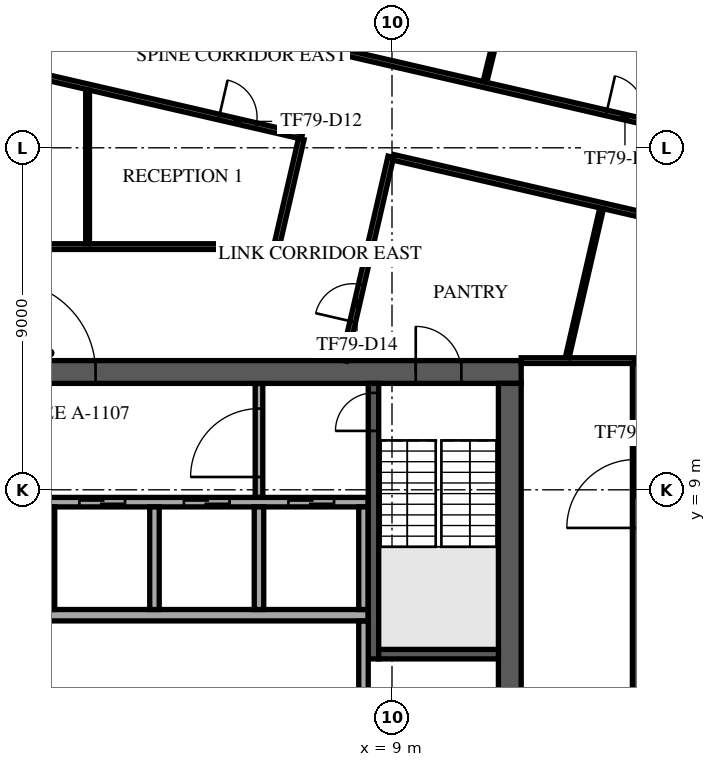
"""IFC4 building model, lengths in metres.
Left out: names, types, materials, properties, quantities, classifications, styles, units other than length and angle.
Written with IfcOpenShell. Run it as: python <this file> out.ifc"""

import sys

from ifc_helpers import new_model, si_unit, direction, frame, frame_2d, origin, place, context, subcontext, project, spatial, rectangle, extrude, element, fill, save


model = new_model("IFC4")
c1 = context("Model", 3, precision=1e-05, world=origin(), true_north=direction((0.0, 1.0)))
c2 = subcontext(c1, "Body", "Model", "MODEL_VIEW")
j1 = project(units=[si_unit("LENGTHUNIT", "METRE"), si_unit("PLANEANGLEUNIT", "RADIAN")], contexts=[c1])
p1 = place(None, origin())
s1 = spatial("IfcSite", under=j1, at=p1, CompositionType="ELEMENT")
p2 = place(p1, origin())
s2 = spatial("IfcBuilding", under=s1, at=p2, CompositionType="ELEMENT")
p3 = place(p2, frame((0.0, 0.0, 332.5)))
s3 = spatial("IfcBuildingStorey", under=s2, at=p3, CompositionType="ELEMENT", Elevation=332.5)
p4 = place(p3, frame((-12.4, 12.1, 0.0), z_axis=(0.0, 0.0, 1.0), x_axis=(1.0, 0.0, 0.0)))
e1 = element("IfcWall", 1, at=p4, inside=s3, PredefinedType="SHEAR", context=c2, shape_type="SweptSolid", body=[
    extrude(rectangle(XDim=24.8, YDim=0.6, at=frame_2d((12.4, 0.0))), origin(), (0.0, 0.0, 1.0), 3.65),
])
p5 = place(p4, frame((11.2, 0.0, 0.0)))
e2 = element("IfcOpeningElement", 2, at=p5, cuts=e1, PredefinedType="OPENING", context=c2, shape_type="SweptSolid", body=[
    extrude(rectangle(XDim=2.4, YDim=2.4, at=frame_2d((1.2, 1.2))), frame((0.0, 0.31, 0.0), z_axis=(0.0, -1.0, 0.0), x_axis=(1.0, 0.0, 0.0)), (0.0, 0.0, 1.0), 0.62),
])
p6 = place(p4, frame((22.025, 0.0, 0.0)))
e3 = element("IfcOpeningElement", 3, at=p6, cuts=e1, PredefinedType="OPENING", context=c2, shape_type="SweptSolid", body=[
    extrude(rectangle(XDim=1.2, YDim=2.1, at=frame_2d((0.6, 1.05))), frame((0.0, 0.31, 0.0), z_axis=(0.0, -1.0, 0.0), x_axis=(1.0, 0.0, 0.0)), (0.0, 0.0, 1.0), 0.62),
])
p7 = place(p4, frame((1.0, 0.0, 0.0)))
e4 = element("IfcOpeningElement", 4, at=p7, cuts=e1, PredefinedType="OPENING", context=c2, shape_type="SweptSolid", body=[
    extrude(rectangle(XDim=1.0, YDim=2.1, at=frame_2d((0.5, 1.05))), frame((0.0, 0.31, 0.0), z_axis=(0.0, -1.0, 0.0), x_axis=(1.0, 0.0, 0.0)), (0.0, 0.0, 1.0), 0.62),
])
p8 = place(p3, frame((12.1, -11.8, 0.0), z_axis=(0.0, 0.0, 1.0), x_axis=(0.0, 1.0, 0.0)))
e5 = element("IfcWall", 5, at=p8, inside=s3, PredefinedType="SHEAR", context=c2, shape_type="SweptSolid", body=[
    extrude(rectangle(XDim=23.6, YDim=0.6, at=frame_2d((11.8, 0.0))), origin(), (0.0, 0.0, 1.0), 3.65),
])
p9 = place(p8, frame((10.6, 0.0, 0.0)))
e6 = element("IfcOpeningElement", 6, at=p9, cuts=e5, PredefinedType="OPENING", context=c2, shape_type="SweptSolid", body=[
    extrude(rectangle(XDim=2.4, YDim=2.4, at=frame_2d((1.2, 1.2))), frame((0.0, 0.31, 0.0), z_axis=(0.0, -1.0, 0.0), x_axis=(1.0, 0.0, 0.0)), (0.0, 0.0, 1.0), 0.62),
])
p10 = place(p3, frame((-8.375, 5.7, 0.0), z_axis=(0.0, 0.0, 1.0), x_axis=(1.0, 0.0, 0.0)))
e7 = element("IfcWall", 7, at=p10, inside=s3, PredefinedType="SOLIDWALL", context=c2, shape_type="SweptSolid", body=[
    extrude(rectangle(XDim=16.75, YDim=0.3, at=frame_2d((8.375, 0.0))), origin(), (0.0, 0.0, 1.0), 3.65),
])
p11 = place(p3, frame((-8.375, 8.675, 0.0), z_axis=(0.0, 0.0, 1.0), x_axis=(1.0, 0.0, 0.0)))
e8 = element("IfcWall", 8, at=p11, inside=s3, PredefinedType="SOLIDWALL", context=c2, shape_type="SweptSolid", body=[
    extrude(rectangle(XDim=16.75, YDim=0.25, at=frame_2d((8.375, 0.0))), origin(), (0.0, 0.0, 1.0), 3.65),
])
p12 = place(p11, frame((0.9, 0.0, 0.0)))
e9 = element("IfcOpeningElement", 9, at=p12, cuts=e8, PredefinedType="OPENING", context=c2, shape_type="SweptSolid", body=[
    extrude(rectangle(XDim=1.2, YDim=2.1, at=frame_2d((0.6, 1.05))), frame((0.0, 0.135, 0.0), z_axis=(0.0, -1.0, 0.0), x_axis=(1.0, 0.0, 0.0)), (0.0, 0.0, 1.0), 0.27),
])
p13 = place(p11, frame((3.65, 0.0, 0.0)))
e10 = element("IfcOpeningElement", 10, at=p13, cuts=e8, PredefinedType="OPENING", context=c2, shape_type="SweptSolid", body=[
    extrude(rectangle(XDim=1.2, YDim=2.1, at=frame_2d((0.6, 1.05))), frame((0.0, 0.135, 0.0), z_axis=(0.0, -1.0, 0.0), x_axis=(1.0, 0.0, 0.0)), (0.0, 0.0, 1.0), 0.27),
])
p14 = place(p11, frame((6.4, 0.0, 0.0)))
e11 = element("IfcOpeningElement", 11, at=p14, cuts=e8, PredefinedType="OPENING", context=c2, shape_type="SweptSolid", body=[
    extrude(rectangle(XDim=1.2, YDim=2.1, at=frame_2d((0.6, 1.05))), frame((0.0, 0.135, 0.0), z_axis=(0.0, -1.0, 0.0), x_axis=(1.0, 0.0, 0.0)), (0.0, 0.0, 1.0), 0.27),
])
p15 = place(p11, frame((9.15, 0.0, 0.0)))
e12 = element("IfcOpeningElement", 12, at=p15, cuts=e8, PredefinedType="OPENING", context=c2, shape_type="SweptSolid", body=[
    extrude(rectangle(XDim=1.2, YDim=2.1, at=frame_2d((0.6, 1.05))), frame((0.0, 0.135, 0.0), z_axis=(0.0, -1.0, 0.0), x_axis=(1.0, 0.0, 0.0)), (0.0, 0.0, 1.0), 0.27),
])
p16 = place(p11, frame((11.9, 0.0, 0.0)))
e13 = element("IfcOpeningElement", 13, at=p16, cuts=e8, PredefinedType="OPENING", context=c2, shape_type="SweptSolid", body=[
    extrude(rectangle(XDim=1.2, YDim=2.1, at=frame_2d((0.6, 1.05))), frame((0.0, 0.135, 0.0), z_axis=(0.0, -1.0, 0.0), x_axis=(1.0, 0.0, 0.0)), (0.0, 0.0, 1.0), 0.27),
])
p17 = place(p11, frame((14.65, 0.0, 0.0)))
e14 = element("IfcOpeningElement", 14, at=p17, cuts=e8, PredefinedType="OPENING", context=c2, shape_type="SweptSolid", body=[
    extrude(rectangle(XDim=1.2, YDim=2.1, at=frame_2d((0.6, 1.05))), frame((0.0, 0.135, 0.0), z_axis=(0.0, -1.0, 0.0), x_axis=(1.0, 0.0, 0.0)), (0.0, 0.0, 1.0), 0.27),
])
for number, where, z_axis, x_axis in (
    (15, (0.0, 5.85, 0.0), (0.0, 0.0, 1.0), (0.0, 1.0, 0.0)),
    (16, (2.75, 5.85, 0.0), (0.0, 0.0, 1.0), (0.0, 1.0, 0.0)),
    (17, (5.5, 5.85, 0.0), (0.0, 0.0, 1.0), (0.0, 1.0, 0.0)),
    (18, (8.25, 5.85, 0.0), (0.0, 0.0, 1.0), (0.0, 1.0, 0.0)),
):
    element("IfcWall", number, at=place(p3, frame(where, z_axis=z_axis, x_axis=x_axis)), inside=s3, PredefinedType="SOLIDWALL", context=c2, shape_type="SweptSolid", body=[
        extrude(rectangle(XDim=2.7, YDim=0.25, at=frame_2d((1.35, 0.0))), origin(), (0.0, 0.0, 1.0), 3.65),
    ])
p18 = place(p3, frame((8.512, 4.55, 0.0), z_axis=(0.0, 0.0, 1.0), x_axis=(0.0, 1.0, 0.0)))
e19 = element("IfcWall", 19, at=p18, inside=s3, PredefinedType="SOLIDWALL", context=c2, shape_type="SweptSolid", body=[
    extrude(rectangle(XDim=7.25, YDim=0.275, at=frame_2d((3.625, 0.0))), origin(), (0.0, 0.0, 1.0), 3.65),
])
p19 = place(p18, frame((6.0, 0.0, 0.0)))
e20 = element("IfcOpeningElement", 20, at=p19, cuts=e19, PredefinedType="OPENING", context=c2, shape_type="SweptSolid", body=[
    extrude(rectangle(XDim=1.0, YDim=2.1, at=frame_2d((0.5, 1.05))), frame((0.0, 0.147, 0.0), z_axis=(0.0, -1.0, 0.0), x_axis=(1.0, 0.0, 0.0)), (0.0, 0.0, 1.0), 0.295),
])
p20 = place(p3, frame((8.65, 4.675, 0.0), z_axis=(0.0, 0.0, 1.0), x_axis=(1.0, 0.0, 0.0)))
e21 = element("IfcWall", 21, at=p20, inside=s3, PredefinedType="SOLIDWALL", context=c2, shape_type="SweptSolid", body=[
    extrude(rectangle(XDim=3.15, YDim=0.25, at=frame_2d((1.575, 0.0))), origin(), (0.0, 0.0, 1.0), 3.65),
])
p21 = place(p3, frame((8.25, 2.855, 0.0), z_axis=(0.0, 0.0, 1.0), x_axis=(0.0, 1.0, 0.0)))
e22 = element("IfcWall", 22, at=p21, inside=s3, PredefinedType="PARTITIONING", context=c2, shape_type="SweptSolid", body=[
    extrude(rectangle(XDim=2.69, YDim=0.25, at=frame_2d((1.345, 0.0))), origin(), (0.0, 0.0, 1.0), 3.65),
])
p22 = place(p3, frame((5.5, 8.805, 0.0), z_axis=(0.0, 0.0, 1.0), x_axis=(0.0, 1.0, 0.0)))
e23 = element("IfcWall", 23, at=p22, inside=s3, PredefinedType="PARTITIONING", context=c2, shape_type="SweptSolid", body=[
    extrude(rectangle(XDim=2.99, YDim=0.2, at=frame_2d((1.495, 0.0))), origin(), (0.0, 0.0, 1.0), 3.65),
])
p23 = place(p22, frame((0.532, 0.0, 0.0)))
e24 = element("IfcOpeningElement", 24, at=p23, cuts=e23, PredefinedType="OPENING", context=c2, shape_type="SweptSolid", body=[
    extrude(rectangle(XDim=1.8, YDim=2.1, at=frame_2d((0.9, 1.05))), frame((0.0, 0.11, 0.0), z_axis=(0.0, -1.0, 0.0), x_axis=(1.0, 0.0, 0.0)), (0.0, 0.0, 1.0), 0.22),
])
p24 = place(p3, frame((-15.325, 15.4, 0.0), z_axis=(0.0, 0.0, 1.0), x_axis=(1.0, 0.0, 0.0)))
e25 = element("IfcWall", 25, at=p24, inside=s3, PredefinedType="PARTITIONING", context=c2, shape_type="SweptSolid", body=[
    extrude(rectangle(XDim=21.285, YDim=0.15, at=frame_2d((10.643, 0.0))), origin(), (0.0, 0.0, 1.0), 3.25),
])
p25 = place(p24, frame((7.665, 0.0, 0.0)))
e26 = element("IfcOpeningElement", 26, at=p25, cuts=e25, PredefinedType="OPENING", context=c2, shape_type="SweptSolid", body=[
    extrude(rectangle(XDim=1.0, YDim=2.1, at=frame_2d((0.5, 1.05))), frame((0.0, 0.085, 0.0), z_axis=(0.0, -1.0, 0.0), x_axis=(1.0, 0.0, 0.0)), (0.0, 0.0, 1.0), 0.17),
])
p26 = place(p24, frame((13.647, 0.0, 0.0)))
e27 = element("IfcOpeningElement", 27, at=p26, cuts=e25, PredefinedType="OPENING", context=c2, shape_type="SweptSolid", body=[
    extrude(rectangle(XDim=1.0, YDim=2.1, at=frame_2d((0.5, 1.05))), frame((0.0, 0.085, 0.0), z_axis=(0.0, -1.0, 0.0), x_axis=(1.0, 0.0, 0.0)), (0.0, 0.0, 1.0), 0.17),
])
p27 = place(p3, frame((-12.802, 22.79, 0.0), z_axis=(0.0, 0.0, 1.0), x_axis=(0.974371384758, -0.224945336838, 0.0)))
e28 = element("IfcWall", 28, at=p27, inside=s3, PredefinedType="PARTITIONING", context=c2, shape_type="SweptSolid", body=[
    extrude(rectangle(XDim=19.943, YDim=0.15, at=frame_2d((9.972, 0.0))), origin(), (0.0, 0.0, 1.0), 3.25),
])
p28 = place(p27, frame((17.705, 0.0, 0.0)))
e29 = element("IfcOpeningElement", 29, at=p28, cuts=e28, PredefinedType="OPENING", context=c2, shape_type="SweptSolid", body=[
    extrude(rectangle(XDim=1.0, YDim=2.1, at=frame_2d((0.5, 1.05))), frame((0.0, 0.085, 0.0), z_axis=(0.0, -1.0, 0.0), x_axis=(1.0, 0.0, 0.0)), (0.0, 0.0, 1.0), 0.17),
])
p29 = place(p3, frame((-12.262, 25.129, 0.0), z_axis=(0.0, 0.0, 1.0), x_axis=(0.974366228137, -0.224967672045, 0.0)))
e30 = element("IfcWall", 30, at=p29, inside=s3, PredefinedType="PARTITIONING", context=c2, shape_type="SweptSolid", body=[
    extrude(rectangle(XDim=35.276, YDim=0.15, at=frame_2d((17.638, 0.0))), origin(), (0.0, 0.0, 1.0), 3.25),
])
p30 = place(p29, frame((1.05, 0.0, 0.0)))
e31 = element("IfcOpeningElement", 31, at=p30, cuts=e30, PredefinedType="OPENING", context=c2, shape_type="SweptSolid", body=[
    extrude(rectangle(XDim=1.8, YDim=2.1, at=frame_2d((0.9, 1.05))), frame((0.0, 0.085, 0.0), z_axis=(0.0, -1.0, 0.0), x_axis=(1.0, 0.0, 0.0)), (0.0, 0.0, 1.0), 0.17),
])
p31 = place(p29, frame((8.524, 0.0, 0.0)))
e32 = element("IfcOpeningElement", 32, at=p31, cuts=e30, PredefinedType="OPENING", context=c2, shape_type="SweptSolid", body=[
    extrude(rectangle(XDim=1.0, YDim=2.1, at=frame_2d((0.5, 1.05))), frame((0.0, 0.085, 0.0), z_axis=(0.0, -1.0, 0.0), x_axis=(1.0, 0.0, 0.0)), (0.0, 0.0, 1.0), 0.17),
])
p32 = place(p29, frame((17.144, 0.0, 0.0)))
e33 = element("IfcOpeningElement", 33, at=p32, cuts=e30, PredefinedType="OPENING", context=c2, shape_type="SweptSolid", body=[
    extrude(rectangle(XDim=1.0, YDim=2.1, at=frame_2d((0.5, 1.05))), frame((0.0, 0.085, 0.0), z_axis=(0.0, -1.0, 0.0), x_axis=(1.0, 0.0, 0.0)), (0.0, 0.0, 1.0), 0.17),
])
p33 = place(p29, frame((27.613, 0.0, 0.0)))
e34 = element("IfcOpeningElement", 34, at=p33, cuts=e30, PredefinedType="OPENING", context=c2, shape_type="SweptSolid", body=[
    extrude(rectangle(XDim=1.0, YDim=2.1, at=frame_2d((0.5, 1.05))), frame((0.0, 0.085, 0.0), z_axis=(0.0, -1.0, 0.0), x_axis=(1.0, 0.0, 0.0)), (0.0, 0.0, 1.0), 0.17),
])
p34 = place(p3, frame((5.981, 15.492, 0.0), z_axis=(0.0, 0.0, 1.0), x_axis=(0.224777043794, 0.97441022192, 0.0)))
e35 = element("IfcWall", 35, at=p34, inside=s3, PredefinedType="PARTITIONING", context=c2, shape_type="SweptSolid", body=[
    extrude(rectangle(XDim=2.811, YDim=0.15, at=frame_2d((1.406, 0.0))), origin(), (0.0, 0.0, 1.0), 3.65),
])
p35 = place(p3, frame((7.731, 12.4, 0.0), z_axis=(0.0, 0.0, 1.0), x_axis=(0.224891896022, 0.974383720668, 0.0)))
e36 = element("IfcWall", 36, at=p35, inside=s3, PredefinedType="PARTITIONING", context=c2, shape_type="SweptSolid", body=[
    extrude(rectangle(XDim=5.505, YDim=0.15, at=frame_2d((2.752, 0.0))), origin(), (0.0, 0.0, 1.0), 3.13),
])
p36 = place(p35, frame((1.05, 0.0, 0.0)))
e37 = element("IfcOpeningElement", 37, at=p36, cuts=e36, PredefinedType="OPENING", context=c2, shape_type="SweptSolid", body=[
    extrude(rectangle(XDim=1.0, YDim=2.1, at=frame_2d((0.5, 1.05))), frame((0.0, 0.085, 0.0), z_axis=(0.0, -1.0, 0.0), x_axis=(1.0, 0.0, 0.0)), (0.0, 0.0, 1.0), 0.17),
])
p37 = place(p3, frame((9.042, 17.747, 0.0), z_axis=(0.0, 0.0, 1.0), x_axis=(0.974374231644, -0.224933004931, 0.0)))
e38 = element("IfcWall", 38, at=p37, inside=s3, PredefinedType="PARTITIONING", context=c2, shape_type="SweptSolid", body=[
    extrude(rectangle(XDim=12.858, YDim=0.15, at=frame_2d((6.429, 0.0))), origin(), (0.0, 0.0, 1.0), 3.25),
])
p38 = place(p3, frame((12.4, 12.4, 0.0), z_axis=(0.0, 0.0, 1.0), x_axis=(1.0, 0.0, 0.0)))
e39 = element("IfcWall", 39, at=p38, inside=s3, PredefinedType="PARTITIONING", context=c2, shape_type="SweptSolid", body=[
    extrude(rectangle(XDim=3.0, YDim=0.15, at=frame_2d((1.5, 0.0))), origin(), (0.0, 0.0, 1.0), 3.13),
])
p39 = place(p3, frame((15.4, -15.325, 0.0), z_axis=(0.0, 0.0, 1.0), x_axis=(0.0, 1.0, 0.0)))
e40 = element("IfcWall", 40, at=p39, inside=s3, PredefinedType="PARTITIONING", context=c2, shape_type="SweptSolid", body=[
    extrude(rectangle(XDim=27.65, YDim=0.15, at=frame_2d((13.825, 0.0))), origin(), (0.0, 0.0, 1.0), 3.25),
])
p40 = place(p39, frame((0.55, 0.0, 0.0)))
e41 = element("IfcOpeningElement", 41, at=p40, cuts=e40, PredefinedType="OPENING", context=c2, shape_type="SweptSolid", body=[
    extrude(rectangle(XDim=1.8, YDim=2.1, at=frame_2d((0.9, 1.05))), frame((0.0, 0.085, 0.0), z_axis=(0.0, -1.0, 0.0), x_axis=(1.0, 0.0, 0.0)), (0.0, 0.0, 1.0), 0.17),
])
p41 = place(p39, frame((6.678, 0.0, 0.0)))
e42 = element("IfcOpeningElement", 42, at=p41, cuts=e40, PredefinedType="OPENING", context=c2, shape_type="SweptSolid", body=[
    extrude(rectangle(XDim=1.0, YDim=2.1, at=frame_2d((0.5, 1.05))), frame((0.0, 0.085, 0.0), z_axis=(0.0, -1.0, 0.0), x_axis=(1.0, 0.0, 0.0)), (0.0, 0.0, 1.0), 0.17),
])
p42 = place(p39, frame((23.322, 0.0, 0.0)))
e43 = element("IfcOpeningElement", 43, at=p42, cuts=e40, PredefinedType="OPENING", context=c2, shape_type="SweptSolid", body=[
    extrude(rectangle(XDim=1.8, YDim=2.1, at=frame_2d((0.9, 1.05))), frame((0.0, 0.085, 0.0), z_axis=(0.0, -1.0, 0.0), x_axis=(1.0, 0.0, 0.0)), (0.0, 0.0, 1.0), 0.17),
])
p43 = place(p3, frame((0.99, 15.475, 0.0), z_axis=(0.0, 0.0, 1.0), x_axis=(0.0, 1.0, 0.0)))
e44 = element("IfcWall", 44, at=p43, inside=s3, PredefinedType="PARTITIONING", context=c2, shape_type="SweptSolid", body=[
    extrude(rectangle(XDim=4.042, YDim=0.1, at=frame_2d((2.021, 0.0))), origin(), (0.0, 0.0, 1.0), 3.65),
])
p44 = place(p3, frame((11.445, 19.733, 0.0), z_axis=(0.0, 0.0, 1.0), x_axis=(0.238465178955, 0.971151048203, 0.0)))
e45 = element("IfcWall", 45, at=p44, inside=s3, PredefinedType="PARTITIONING", context=c2, shape_type="SweptSolid", body=[
    extrude(rectangle(XDim=7.597, YDim=0.1, at=frame_2d((3.798, 0.0))), origin(), (0.0, 0.0, 1.0), 3.05),
])
p45 = place(p3, frame((13.612, 12.486, 0.0), z_axis=(0.0, 0.0, 1.0), x_axis=(0.224788589714, 0.974407558435, 0.0)))
e46 = element("IfcWall", 46, at=p45, inside=s3, PredefinedType="PARTITIONING", context=c2, shape_type="SweptSolid", body=[
    extrude(rectangle(XDim=4.023, YDim=0.1, at=frame_2d((2.011, 0.0))), origin(), (0.0, 0.0, 1.0), 3.25),
])
p46 = place(p5, origin())
e47 = element("IfcDoor", 47, at=p46, inside=s3, OperationType="SINGLE_SWING_LEFT", PredefinedType="DOOR", context=c2, shape_type="SweptSolid", body=[
    extrude(rectangle(XDim=2.4, YDim=2.4, at=frame_2d((1.2, 1.2))), frame((0.0, 0.025, 0.0), z_axis=(0.0, -1.0, 0.0), x_axis=(1.0, 0.0, 0.0)), (0.0, 0.0, 1.0), 0.05),
])
fill(e2, e47)
p47 = place(p6, origin())
e48 = element("IfcDoor", 48, at=p47, inside=s3, OperationType="SINGLE_SWING_LEFT", PredefinedType="DOOR", context=c2, shape_type="SweptSolid", body=[
    extrude(rectangle(XDim=1.2, YDim=2.1, at=frame_2d((0.6, 1.05))), frame((0.0, 0.025, 0.0), z_axis=(0.0, -1.0, 0.0), x_axis=(1.0, 0.0, 0.0)), (0.0, 0.0, 1.0), 0.05),
])
fill(e3, e48)
p48 = place(p15, origin())
e49 = element("IfcDoor", 49, at=p48, inside=s3, OperationType="DOUBLE_DOOR_SLIDING", PredefinedType="DOOR", context=c2, shape_type="SweptSolid", body=[
    extrude(rectangle(XDim=1.2, YDim=2.1, at=frame_2d((0.6, 1.05))), frame((0.0, 0.025, 0.0), z_axis=(0.0, -1.0, 0.0), x_axis=(1.0, 0.0, 0.0)), (0.0, 0.0, 1.0), 0.05),
])
fill(e12, e49)
p49 = place(p16, origin())
e50 = element("IfcDoor", 50, at=p49, inside=s3, OperationType="DOUBLE_DOOR_SLIDING", PredefinedType="DOOR", context=c2, shape_type="SweptSolid", body=[
    extrude(rectangle(XDim=1.2, YDim=2.1, at=frame_2d((0.6, 1.05))), frame((0.0, 0.025, 0.0), z_axis=(0.0, -1.0, 0.0), x_axis=(1.0, 0.0, 0.0)), (0.0, 0.0, 1.0), 0.05),
])
fill(e13, e50)
p50 = place(p17, origin())
e51 = element("IfcDoor", 51, at=p50, inside=s3, OperationType="DOUBLE_DOOR_SLIDING", PredefinedType="DOOR", context=c2, shape_type="SweptSolid", body=[
    extrude(rectangle(XDim=1.2, YDim=2.1, at=frame_2d((0.6, 1.05))), frame((0.0, 0.025, 0.0), z_axis=(0.0, -1.0, 0.0), x_axis=(1.0, 0.0, 0.0)), (0.0, 0.0, 1.0), 0.05),
])
fill(e14, e51)
p51 = place(p19, origin())
e52 = element("IfcDoor", 52, at=p51, inside=s3, OperationType="SINGLE_SWING_LEFT", PredefinedType="DOOR", context=c2, shape_type="SweptSolid", body=[
    extrude(rectangle(XDim=1.0, YDim=2.1, at=frame_2d((0.5, 1.05))), frame((0.0, 0.025, 0.0), z_axis=(0.0, -1.0, 0.0), x_axis=(1.0, 0.0, 0.0)), (0.0, 0.0, 1.0), 0.05),
])
fill(e20, e52)
p52 = place(p23, origin())
e53 = element("IfcDoor", 53, at=p52, inside=s3, OperationType="SINGLE_SWING_LEFT", PredefinedType="DOOR", context=c2, shape_type="SweptSolid", body=[
    extrude(rectangle(XDim=1.8, YDim=2.1, at=frame_2d((0.9, 1.05))), frame((0.0, 0.025, 0.0), z_axis=(0.0, -1.0, 0.0), x_axis=(1.0, 0.0, 0.0)), (0.0, 0.0, 1.0), 0.05),
])
fill(e24, e53)
p53 = place(p28, frame((1.0, 0.0, 0.0), z_axis=(0.0, 0.0, 1.0), x_axis=(-1.0, 0.0, 0.0)))
e54 = element("IfcDoor", 54, at=p53, inside=s3, OperationType="SINGLE_SWING_RIGHT", PredefinedType="DOOR", context=c2, shape_type="SweptSolid", body=[
    extrude(rectangle(XDim=1.0, YDim=2.1, at=frame_2d((0.5, 1.05))), frame((0.0, 0.025, 0.0), z_axis=(0.0, -1.0, 0.0), x_axis=(1.0, 0.0, 0.0)), (0.0, 0.0, 1.0), 0.05),
])
fill(e29, e54)
p54 = place(p36, frame((1.0, 0.0, 0.0), z_axis=(0.0, 0.0, 1.0), x_axis=(-1.0, 0.0, 0.0)))
e55 = element("IfcDoor", 55, at=p54, inside=s3, OperationType="SINGLE_SWING_RIGHT", PredefinedType="DOOR", context=c2, shape_type="SweptSolid", body=[
    extrude(rectangle(XDim=1.0, YDim=2.1, at=frame_2d((0.5, 1.05))), frame((0.0, 0.025, 0.0), z_axis=(0.0, -1.0, 0.0), x_axis=(1.0, 0.0, 0.0)), (0.0, 0.0, 1.0), 0.05),
])
fill(e37, e55)
p55 = place(p42, frame((1.8, 0.0, 0.0), z_axis=(0.0, 0.0, 1.0), x_axis=(-1.0, 0.0, 0.0)))
e56 = element("IfcDoor", 56, at=p55, inside=s3, OperationType="DOUBLE_DOOR_SINGLE_SWING", PredefinedType="DOOR", context=c2, shape_type="SweptSolid", body=[
    extrude(rectangle(XDim=1.8, YDim=2.1, at=frame_2d((0.9, 1.05))), frame((0.0, 0.025, 0.0), z_axis=(0.0, -1.0, 0.0), x_axis=(1.0, 0.0, 0.0)), (0.0, 0.0, 1.0), 0.05),
])
fill(e43, e56)
p56 = place(p33, origin())
e57 = element("IfcDoor", 57, at=p56, inside=s3, OperationType="SINGLE_SWING_LEFT", PredefinedType="DOOR", context=c2, shape_type="SweptSolid", body=[
    extrude(rectangle(XDim=1.0, YDim=2.1, at=frame_2d((0.5, 1.05))), frame((0.0, 0.025, 0.0), z_axis=(0.0, -1.0, 0.0), x_axis=(1.0, 0.0, 0.0)), (0.0, 0.0, 1.0), 0.05),
])
fill(e34, e57)
save(model, sys.argv[1])
